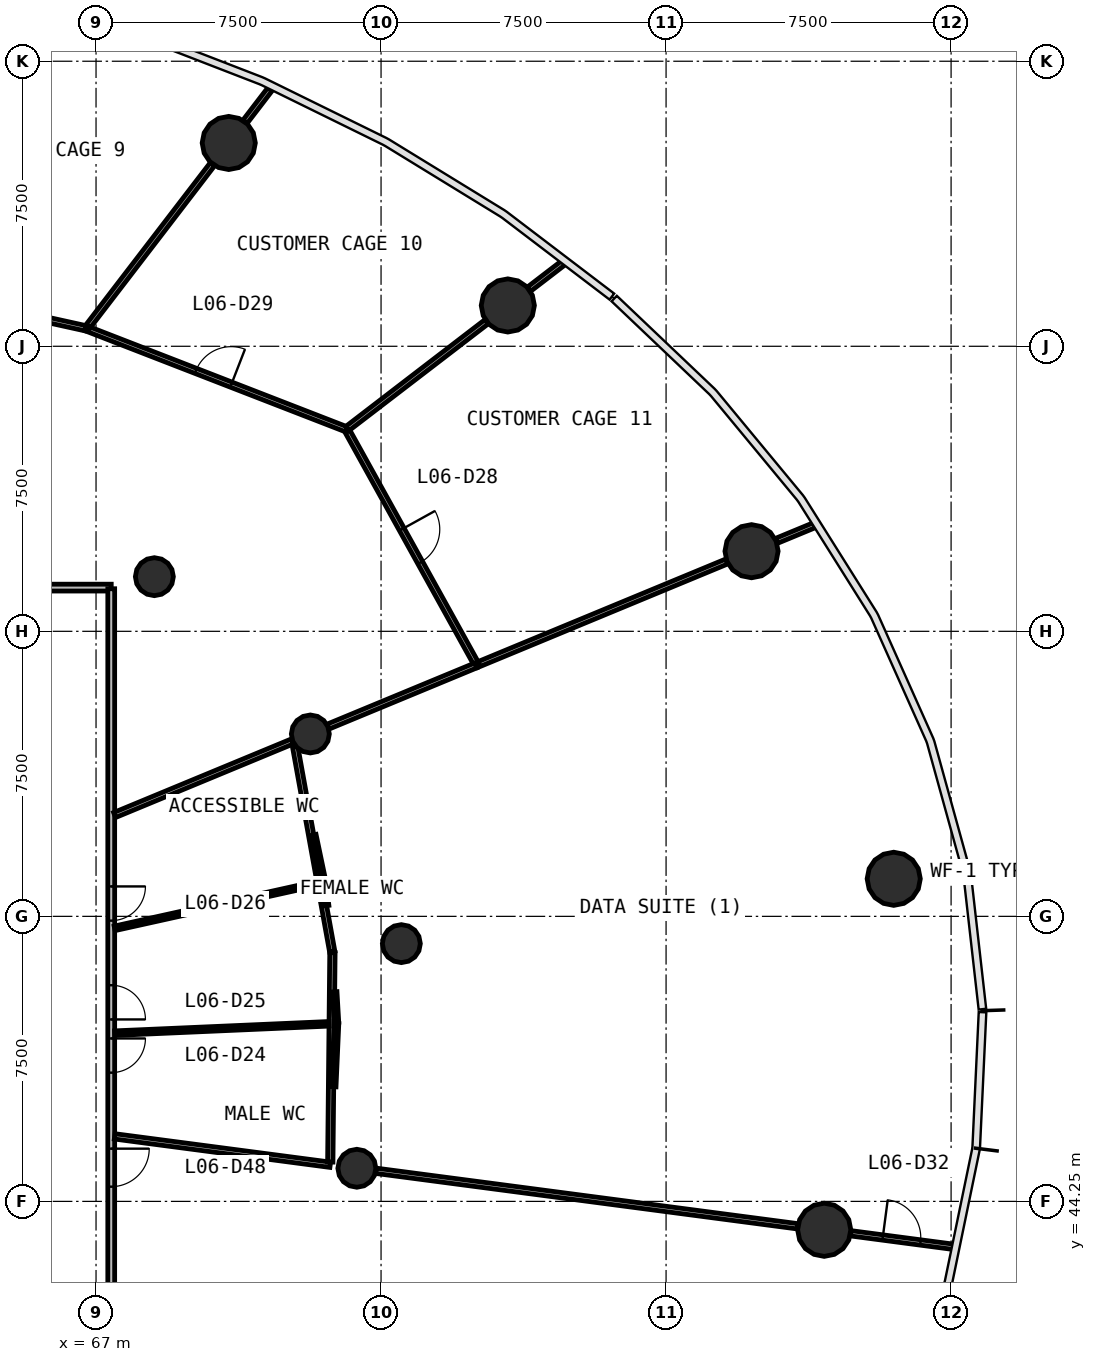
"""IFC4 building model, lengths in metres.
Left out: names, types, materials, properties, quantities, classifications, styles, units other than length and angle.
Written with IfcOpenShell. Run it as: python <this file> out.ifc"""

import sys

from ifc_helpers import new_model, si_unit, direction, frame, frame_2d, origin, origin_2d, place, context, subcontext, project, spatial, rectangle, circle, extrude, source, transform, mapped, element, fill, save


model = new_model("IFC4")
c1 = context("Model", 3, precision=1e-05, world=origin(), true_north=direction((0.0, 1.0)))
c2 = subcontext(c1, "Body", "Model", "MODEL_VIEW")
j1 = project(units=[si_unit("LENGTHUNIT", "METRE"), si_unit("PLANEANGLEUNIT", "RADIAN")], contexts=[c1])
p1 = place(None, origin())
s1 = spatial("IfcSite", under=j1, at=p1, CompositionType="ELEMENT")
p2 = place(p1, origin())
s2 = spatial("IfcBuilding", under=s1, at=p2, CompositionType="ELEMENT")
p3 = place(p2, frame((0.0, 0.0, 27.0)))
s3 = spatial("IfcBuildingStorey", under=s2, at=p3, CompositionType="ELEMENT", Elevation=27.0)
m1 = source(origin(), c2, "Body", "SweptSolid", [
    extrude(circle(Radius=0.7, at=origin_2d()), origin(), (0.0, 0.0, 1.0), 4.4),
])
for number, where, z_axis, x_axis in (
    (1, (87.99, 52.738, 0.0), (0.0, 0.0, 1.0), (1.0, 0.0, 0.0)),
    (2, (84.249, 61.358, 0.0), (0.0, 0.0, 1.0), (1.0, 0.0, 0.0)),
    (3, (77.836, 67.824, 0.0), (0.0, 0.0, 1.0), (1.0, 0.0, 0.0)),
    (4, (70.492, 72.1, 0.0), (0.0, 0.0, 1.0), (1.0, 0.0, 0.0)),
    (5, (86.161, 43.503, 0.0), (0.0, 0.0, 1.0), (1.0, 0.0, 0.0)),
):
    element("IfcColumn", number, at=place(p3, frame(where, z_axis=z_axis, x_axis=x_axis)), inside=s3, PredefinedType="COLUMN", context=c2, shape_type="MappedRepresentation", body=[
        mapped(m1, transform((0.0, 0.0, 0.0), scale=1.0)),
    ])
m2 = source(origin(), c2, "Body", "SweptSolid", [
    extrude(circle(Radius=0.5, at=origin_2d()), origin(), (0.0, 0.0, 1.0), 4.4),
])
for number, where, z_axis, x_axis in (
    (6, (75.034, 51.032, 0.0), (0.0, 0.0, 1.0), (1.0, 0.0, 0.0)),
    (7, (72.639, 56.549, 0.0), (0.0, 0.0, 1.0), (1.0, 0.0, 0.0)),
    (8, (68.535, 60.688, 0.0), (0.0, 0.0, 1.0), (1.0, 0.0, 0.0)),
    (9, (73.863, 45.122, 0.0), (0.0, 0.0, 1.0), (1.0, 0.0, 0.0)),
):
    element("IfcColumn", number, at=place(p3, frame(where, z_axis=z_axis, x_axis=x_axis)), inside=s3, PredefinedType="COLUMN", context=c2, shape_type="MappedRepresentation", body=[
        mapped(m2, transform((0.0, 0.0, 0.0), scale=1.0)),
    ])
p4 = place(p3, frame((36.6, 60.4, 0.0), z_axis=(0.0, 0.0, 1.0), x_axis=(1.0, 0.0, 0.0)))
e10 = element("IfcWall", 10, at=p4, inside=s3, PredefinedType="PARTITIONING", context=c2, shape_type="SweptSolid", body=[
    extrude(rectangle(XDim=30.8, YDim=0.18, at=frame_2d((15.4, 0.0))), origin(), (0.0, 0.0, 1.0), 3.05),
])
p5 = place(p4, frame((17.35, 0.0, 0.0)))
e11 = element("IfcOpeningElement", 11, at=p5, cuts=e10, PredefinedType="OPENING", context=c2, shape_type="SweptSolid", body=[
    extrude(rectangle(XDim=1.0, YDim=2.1, at=frame_2d((0.5, 1.05))), frame((0.0, 0.1, 0.0), z_axis=(0.0, -1.0, 0.0), x_axis=(1.0, 0.0, 0.0)), (0.0, 0.0, 1.0), 0.2),
])
p6 = place(p4, frame((14.95, 0.0, 0.0)))
e12 = element("IfcOpeningElement", 12, at=p6, cuts=e10, PredefinedType="OPENING", context=c2, shape_type="SweptSolid", body=[
    extrude(rectangle(XDim=1.0, YDim=2.1, at=frame_2d((0.5, 1.05))), frame((0.0, 0.1, 0.0), z_axis=(0.0, -1.0, 0.0), x_axis=(1.0, 0.0, 0.0)), (0.0, 0.0, 1.0), 0.2),
])
p7 = place(p4, frame((12.55, 0.0, 0.0)))
e13 = element("IfcOpeningElement", 13, at=p7, cuts=e10, PredefinedType="OPENING", context=c2, shape_type="SweptSolid", body=[
    extrude(rectangle(XDim=1.0, YDim=2.1, at=frame_2d((0.5, 1.05))), frame((0.0, 0.1, 0.0), z_axis=(0.0, -1.0, 0.0), x_axis=(1.0, 0.0, 0.0)), (0.0, 0.0, 1.0), 0.2),
])
p8 = place(p3, frame((67.4, 60.37, 0.0), z_axis=(0.0, 0.0, 1.0), x_axis=(0.0, -1.0, 0.0)))
e14 = element("IfcWall", 14, at=p8, inside=s3, PredefinedType="PARTITIONING", context=c2, shape_type="SweptSolid", body=[
    extrude(rectangle(XDim=23.583, YDim=0.18, at=frame_2d((11.791, 0.0))), origin(), (0.0, 0.0, 1.0), 3.05),
])
p9 = place(p8, frame((11.833, 0.0, 0.0)))
e15 = element("IfcOpeningElement", 15, at=p9, cuts=e14, PredefinedType="OPENING", context=c2, shape_type="SweptSolid", body=[
    extrude(rectangle(XDim=0.9, YDim=2.1, at=frame_2d((0.45, 1.05))), frame((0.0, 0.1, 0.0), z_axis=(0.0, -1.0, 0.0), x_axis=(1.0, 0.0, 0.0)), (0.0, 0.0, 1.0), 0.2),
])
p10 = place(p8, frame((10.433, 0.0, 0.0)))
e16 = element("IfcOpeningElement", 16, at=p10, cuts=e14, PredefinedType="OPENING", context=c2, shape_type="SweptSolid", body=[
    extrude(rectangle(XDim=0.9, YDim=2.1, at=frame_2d((0.45, 1.05))), frame((0.0, 0.1, 0.0), z_axis=(0.0, -1.0, 0.0), x_axis=(1.0, 0.0, 0.0)), (0.0, 0.0, 1.0), 0.2),
])
p11 = place(p8, frame((7.833, 0.0, 0.0)))
e17 = element("IfcOpeningElement", 17, at=p11, cuts=e14, PredefinedType="OPENING", context=c2, shape_type="SweptSolid", body=[
    extrude(rectangle(XDim=0.9, YDim=2.1, at=frame_2d((0.45, 1.05))), frame((0.0, 0.1, 0.0), z_axis=(0.0, -1.0, 0.0), x_axis=(1.0, 0.0, 0.0)), (0.0, 0.0, 1.0), 0.2),
])
p12 = place(p8, frame((19.133, 0.0, 0.0)))
e18 = element("IfcOpeningElement", 18, at=p12, cuts=e14, PredefinedType="OPENING", context=c2, shape_type="SweptSolid", body=[
    extrude(rectangle(XDim=1.0, YDim=2.1, at=frame_2d((0.5, 1.05))), frame((0.0, 0.1, 0.0), z_axis=(0.0, -1.0, 0.0), x_axis=(1.0, 0.0, 0.0)), (0.0, 0.0, 1.0), 0.2),
])
p13 = place(p8, frame((14.732, 0.0, 0.0)))
e19 = element("IfcOpeningElement", 19, at=p13, cuts=e14, PredefinedType="OPENING", context=c2, shape_type="SweptSolid", body=[
    extrude(rectangle(XDim=1.0, YDim=2.1, at=frame_2d((0.5, 1.05))), frame((0.0, 0.1, 0.0), z_axis=(0.0, -1.0, 0.0), x_axis=(1.0, 0.0, 0.0)), (0.0, 0.0, 1.0), 0.2),
])
p14 = place(p3, frame((74.363, 45.056, 0.0), z_axis=(0.0, 0.0, 1.0), x_axis=(0.991443306772, -0.130538000051, 0.0)))
e20 = element("IfcWall", 20, at=p14, inside=s3, PredefinedType="PARTITIONING", context=c2, shape_type="SweptSolid", body=[
    extrude(rectangle(XDim=11.195, YDim=0.14, at=frame_2d((5.598, 0.0))), origin(), (0.0, 0.0, 1.0), 3.05),
])
p15 = place(p3, frame((66.747, 67.219, 0.0), z_axis=(0.0, 0.0, 1.0), x_axis=(0.932284149261, -0.361726782305, 0.0)))
e21 = element("IfcWall", 21, at=p15, inside=s3, PredefinedType="PARTITIONING", context=c2, shape_type="SweptSolid", body=[
    extrude(rectangle(XDim=7.337, YDim=0.14, at=frame_2d((3.668, 0.0))), origin(), (0.0, 0.0, 1.0), 3.05),
])
p16 = place(p15, frame((3.087, 0.0, 0.0)))
e22 = element("IfcOpeningElement", 22, at=p16, cuts=e21, PredefinedType="OPENING", context=c2, shape_type="SweptSolid", body=[
    extrude(rectangle(XDim=1.0, YDim=2.1, at=frame_2d((0.5, 1.05))), frame((0.0, 0.08, 0.0), z_axis=(0.0, -1.0, 0.0), x_axis=(1.0, 0.0, 0.0)), (0.0, 0.0, 1.0), 0.16),
])
p17 = place(p3, frame((77.021, 58.364, 0.0), z_axis=(0.0, 0.0, 1.0), x_axis=(0.923882643146, 0.382675922542, 0.0)))
e23 = element("IfcWall", 23, at=p17, inside=s3, PredefinedType="PARTITIONING", context=c2, shape_type="SweptSolid", body=[
    extrude(rectangle(XDim=7.118, YDim=0.14, at=frame_2d((3.559, 0.0))), origin(), (0.0, 0.0, 1.0), 3.05),
])
p18 = place(p3, frame((73.602, 64.539, 0.0), z_axis=(0.0, 0.0, 1.0), x_axis=(0.484486331766, -0.874798830779, 0.0)))
e24 = element("IfcWall", 24, at=p18, inside=s3, PredefinedType="PARTITIONING", context=c2, shape_type="SweptSolid", body=[
    extrude(rectangle(XDim=7.028, YDim=0.14, at=frame_2d((3.514, 0.0))), origin(), (0.0, 0.0, 1.0), 3.05),
])
p19 = place(p18, frame((2.978, 0.0, 0.0)))
e25 = element("IfcOpeningElement", 25, at=p19, cuts=e24, PredefinedType="OPENING", context=c2, shape_type="SweptSolid", body=[
    extrude(rectangle(XDim=1.0, YDim=2.1, at=frame_2d((0.5, 1.05))), frame((0.0, 0.08, 0.0), z_axis=(0.0, -1.0, 0.0), x_axis=(1.0, 0.0, 0.0)), (0.0, 0.0, 1.0), 0.16),
])
p20 = place(p3, frame((60.529, 68.591, 0.0), z_axis=(0.0, 0.0, 1.0), x_axis=(0.976496953748, -0.21553120266, 0.0)))
e26 = element("IfcWall", 26, at=p20, inside=s3, PredefinedType="PARTITIONING", context=c2, shape_type="SweptSolid", body=[
    extrude(rectangle(XDim=6.338, YDim=0.14, at=frame_2d((3.169, 0.0))), origin(), (0.0, 0.0, 1.0), 3.05),
])
p21 = place(p20, frame((2.688, 0.0, 0.0)))
e27 = element("IfcOpeningElement", 27, at=p21, cuts=e26, PredefinedType="OPENING", context=c2, shape_type="SweptSolid", body=[
    extrude(rectangle(XDim=1.0, YDim=2.1, at=frame_2d((0.5, 1.05))), frame((0.0, 0.08, 0.0), z_axis=(0.0, -1.0, 0.0), x_axis=(1.0, 0.0, 0.0)), (0.0, 0.0, 1.0), 0.16),
])
p22 = place(p3, frame((67.49, 45.961, 0.0), z_axis=(0.0, 0.0, 1.0), x_axis=(0.991446015801, -0.130517423176, 0.0)))
e28 = element("IfcWall", 28, at=p22, inside=s3, PredefinedType="PARTITIONING", context=c2, shape_type="SweptSolid", body=[
    extrude(rectangle(XDim=5.722, YDim=0.14, at=frame_2d((2.861, 0.0))), origin(), (0.0, 0.0, 1.0), 3.05),
])
p23 = place(p3, frame((73.164, 45.284, 0.0), z_axis=(0.0, 0.0, 1.0), x_axis=(0.01027995485, 0.999947159868, 0.0)))
e29 = element("IfcWall", 29, at=p23, inside=s3, PredefinedType="PARTITIONING", context=c2, shape_type="SweptSolid", body=[
    extrude(rectangle(XDim=5.51, YDim=0.14, at=frame_2d((2.755, 0.0))), origin(), (0.0, 0.0, 1.0), 3.05),
])
p24 = place(p3, frame((73.215, 50.823, 0.0), z_axis=(0.0, 0.0, 1.0), x_axis=(-0.178121903576, 0.984008428555, 0.0)))
e30 = element("IfcWall", 30, at=p24, inside=s3, PredefinedType="PARTITIONING", context=c2, shape_type="SweptSolid", body=[
    extrude(rectangle(XDim=5.515, YDim=0.14, at=frame_2d((2.758, 0.0))), origin(), (0.0, 0.0, 1.0), 3.05),
])
p25 = place(p3, frame((66.792, 67.277, 0.0), z_axis=(0.0, 0.0, 1.0), x_axis=(0.608764273517, 0.793351157615, 0.0)))
e31 = element("IfcWall", 31, at=p25, inside=s3, PredefinedType="PARTITIONING", context=c2, shape_type="SweptSolid", body=[
    extrude(rectangle(XDim=5.375, YDim=0.14, at=frame_2d((2.688, 0.0))), origin(), (0.0, 0.0, 1.0), 3.05),
])
p26 = place(p3, frame((67.49, 54.416, 0.0), z_axis=(0.0, 0.0, 1.0), x_axis=(0.923890025086, 0.382658100067, 0.0)))
e32 = element("IfcWall", 32, at=p26, inside=s3, PredefinedType="PARTITIONING", context=c2, shape_type="SweptSolid", body=[
    extrude(rectangle(XDim=5.068, YDim=0.14, at=frame_2d((2.534, 0.0))), origin(), (0.0, 0.0, 1.0), 3.05),
])
p27 = place(p3, frame((73.611, 64.583, 0.0), z_axis=(0.0, 0.0, 1.0), x_axis=(0.793369862055, 0.608739896821, 0.0)))
e33 = element("IfcWall", 33, at=p27, inside=s3, PredefinedType="PARTITIONING", context=c2, shape_type="SweptSolid", body=[
    extrude(rectangle(XDim=4.62, YDim=0.14, at=frame_2d((2.31, 0.0))), origin(), (0.0, 0.0, 1.0), 3.05),
])
p28 = place(p3, frame((73.106, 56.742, 0.0), z_axis=(0.0, 0.0, 1.0), x_axis=(0.923866219986, 0.382715570063, 0.0)))
e34 = element("IfcWall", 34, at=p28, inside=s3, PredefinedType="PARTITIONING", context=c2, shape_type="SweptSolid", body=[
    extrude(rectangle(XDim=4.208, YDim=0.14, at=frame_2d((2.104, 0.0))), origin(), (0.0, 0.0, 1.0), 3.05),
])
p29 = place(p3, frame((86.859, 43.411, 0.0), z_axis=(0.0, 0.0, 1.0), x_axis=(0.991449119506, -0.130493844417, 0.0)))
e35 = element("IfcWall", 35, at=p29, inside=s3, PredefinedType="PARTITIONING", context=c2, shape_type="SweptSolid", body=[
    extrude(rectangle(XDim=2.73, YDim=0.14, at=frame_2d((1.365, 0.0))), origin(), (0.0, 0.0, 1.0), 3.05),
])
p30 = place(p29, frame((0.85, 0.0, 0.0)))
e36 = element("IfcOpeningElement", 36, at=p30, cuts=e35, PredefinedType="OPENING", context=c2, shape_type="SweptSolid", body=[
    extrude(rectangle(XDim=1.0, YDim=2.1, at=frame_2d((0.5, 1.05))), frame((0.0, 0.08, 0.0), z_axis=(0.0, -1.0, 0.0), x_axis=(1.0, 0.0, 0.0)), (0.0, 0.0, 1.0), 0.16),
])
p31 = place(p3, frame((78.394, 68.253, 0.0), z_axis=(0.0, 0.0, 1.0), x_axis=(0.793427142315, 0.608665236266, 0.0)))
e37 = element("IfcWall", 37, at=p31, inside=s3, PredefinedType="PARTITIONING", context=c2, shape_type="SweptSolid", body=[
    extrude(rectangle(XDim=1.14, YDim=0.14, at=frame_2d((0.57, 0.0))), origin(), (0.0, 0.0, 1.0), 3.05),
])
p32 = place(p3, frame((84.9, 61.628, 0.0), z_axis=(0.0, 0.0, 1.0), x_axis=(0.923846875311, 0.382762264308, 0.0)))
e38 = element("IfcWall", 38, at=p32, inside=s3, PredefinedType="PARTITIONING", context=c2, shape_type="SweptSolid", body=[
    extrude(rectangle(XDim=1.086, YDim=0.14, at=frame_2d((0.543, 0.0))), origin(), (0.0, 0.0, 1.0), 3.05),
])
p33 = place(p3, frame((70.921, 72.658, 0.0), z_axis=(0.0, 0.0, 1.0), x_axis=(0.60884531533, 0.793288965006, 0.0)))
e39 = element("IfcWall", 39, at=p33, inside=s3, PredefinedType="PARTITIONING", context=c2, shape_type="SweptSolid", body=[
    extrude(rectangle(XDim=1.077, YDim=0.14, at=frame_2d((0.539, 0.0))), origin(), (0.0, 0.0, 1.0), 3.05),
])
p34 = place(p3, frame((67.49, 48.676, 0.0), z_axis=(0.0, 0.0, 1.0), x_axis=(0.999047900763, 0.043626734695, 0.0)))
e40 = element("IfcWall", 40, at=p34, inside=s3, PredefinedType="PARTITIONING", context=c2, shape_type="SweptSolid", body=[
    extrude(rectangle(XDim=5.646, YDim=0.12, at=frame_2d((2.823, 0.0))), origin(), (0.0, 0.0, 1.0), 3.05),
])
p35 = place(p3, frame((67.49, 51.434, 0.0), z_axis=(0.0, 0.0, 1.0), x_axis=(0.976301624895, 0.216414272234, 0.0)))
e41 = element("IfcWall", 41, at=p35, inside=s3, PredefinedType="PARTITIONING", context=c2, shape_type="SweptSolid", body=[
    extrude(rectangle(XDim=5.459, YDim=0.12, at=frame_2d((2.729, 0.0))), origin(), (0.0, 0.0, 1.0), 3.05),
])
p36 = place(p3, frame((72.99, 52.654, 0.0), z_axis=(0.0, 0.0, 1.0), x_axis=(-0.205214844297, 0.978716949726, 0.0)))
e42 = element("IfcWall", 42, at=p36, inside=s3, PredefinedType="PARTITIONING", context=c2, shape_type="SweptSolid", body=[
    extrude(rectangle(XDim=1.268, YDim=0.12, at=frame_2d((0.634, 0.0))), origin(), (0.0, 0.0, 1.0), 3.05),
])
p37 = place(p3, frame((73.254, 47.266, 0.0), z_axis=(0.0, 0.0, 1.0), x_axis=(0.044384369805, 0.999014528281, 0.0)))
e43 = element("IfcWall", 43, at=p37, inside=s3, PredefinedType="PARTITIONING", context=c2, shape_type="SweptSolid", body=[
    extrude(rectangle(XDim=1.667, YDim=0.12, at=frame_2d((0.833, 0.0))), origin(), (0.0, 0.0, 1.0), 3.05),
])
p38 = place(p3, frame((73.067, 52.033, 0.0), z_axis=(0.0, 0.0, 1.0), x_axis=(-0.122571436724, 0.992459693337, 0.0)))
e44 = element("IfcWall", 44, at=p38, inside=s3, PredefinedType="PARTITIONING", context=c2, shape_type="SweptSolid", body=[
    extrude(rectangle(XDim=0.595, YDim=0.12, at=frame_2d((0.298, 0.0))), origin(), (0.0, 0.0, 1.0), 3.05),
])
p39 = place(p3, frame((73.326, 48.961, 0.0), z_axis=(0.0, 0.0, 1.0), x_axis=(-0.05788698247, 0.998323142705, 0.0)))
e45 = element("IfcWall", 45, at=p39, inside=s3, PredefinedType="PARTITIONING", context=c2, shape_type="SweptSolid", body=[
    extrude(rectangle(XDim=0.806, YDim=0.12, at=frame_2d((0.403, 0.0))), origin(), (0.0, 0.0, 1.0), 3.05),
])
m3 = source(origin(), c2, "Body", "SweptSolid", [
    extrude(rectangle(XDim=0.9, YDim=2.1, at=frame_2d((0.45, 1.05))), frame((0.0, 0.025, 0.0), z_axis=(0.0, -1.0, 0.0), x_axis=(1.0, 0.0, 0.0)), (0.0, 0.0, 1.0), 0.05),
])
p40 = place(p9, origin())
e46 = element("IfcDoor", 46, at=p40, inside=s3, OperationType="SINGLE_SWING_LEFT", PredefinedType="DOOR", context=c2, shape_type="MappedRepresentation", body=[
    mapped(m3, transform((0.0, 0.0, 0.0), scale=1.0)),
])
fill(e15, e46)
p41 = place(p10, origin())
e47 = element("IfcDoor", 47, at=p41, inside=s3, OperationType="SINGLE_SWING_RIGHT", PredefinedType="DOOR", context=c2, shape_type="MappedRepresentation", body=[
    mapped(m3, transform((0.0, 0.0, 0.0), scale=1.0)),
])
fill(e16, e47)
p42 = place(p11, origin())
e48 = element("IfcDoor", 48, at=p42, inside=s3, OperationType="SINGLE_SWING_LEFT", PredefinedType="DOOR", context=c2, shape_type="MappedRepresentation", body=[
    mapped(m3, transform((0.0, 0.0, 0.0), scale=1.0)),
])
fill(e17, e48)
m4 = source(origin(), c2, "Body", "SweptSolid", [
    extrude(rectangle(XDim=1.0, YDim=2.1, at=frame_2d((0.5, 1.05))), frame((0.0, 0.025, 0.0), z_axis=(0.0, -1.0, 0.0), x_axis=(1.0, 0.0, 0.0)), (0.0, 0.0, 1.0), 0.05),
])
p43 = place(p19, origin())
e49 = element("IfcDoor", 49, at=p43, inside=s3, OperationType="SINGLE_SWING_LEFT", PredefinedType="DOOR", context=c2, shape_type="MappedRepresentation", body=[
    mapped(m4, transform((0.0, 0.0, 0.0), scale=1.0)),
])
fill(e25, e49)
p44 = place(p16, origin())
e50 = element("IfcDoor", 50, at=p44, inside=s3, OperationType="SINGLE_SWING_RIGHT", PredefinedType="DOOR", context=c2, shape_type="MappedRepresentation", body=[
    mapped(m4, transform((0.0, 0.0, 0.0), scale=1.0)),
])
fill(e22, e50)
p45 = place(p30, origin())
e51 = element("IfcDoor", 51, at=p45, inside=s3, OperationType="SINGLE_SWING_LEFT", PredefinedType="DOOR", context=c2, shape_type="MappedRepresentation", body=[
    mapped(m4, transform((0.0, 0.0, 0.0), scale=1.0)),
])
fill(e36, e51)
p46 = place(p13, origin())
e52 = element("IfcDoor", 52, at=p46, inside=s3, OperationType="SINGLE_SWING_LEFT", PredefinedType="DOOR", context=c2, shape_type="MappedRepresentation", body=[
    mapped(m4, transform((0.0, 0.0, 0.0), scale=1.0)),
])
fill(e19, e52)
save(model, sys.argv[1])
